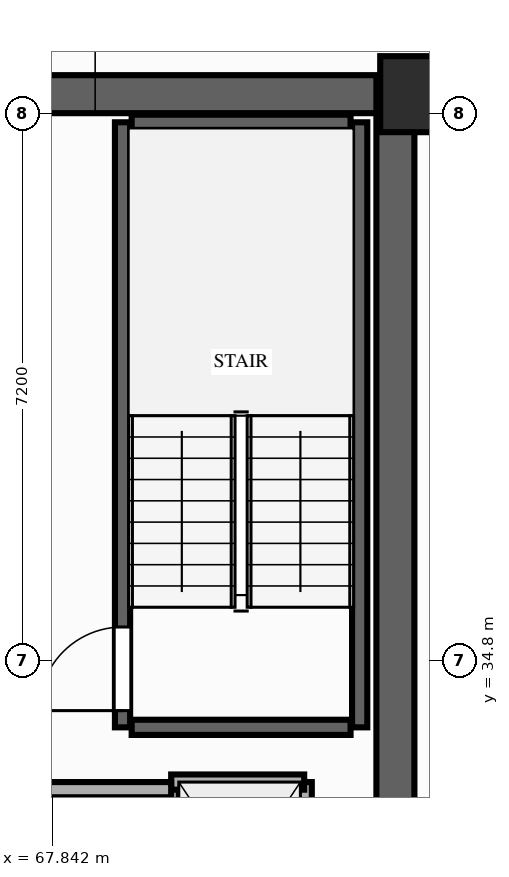
"""IFC4 building model, lengths in metres.
Left out: names, types, materials, properties, quantities, classifications, styles, units other than length and angle.
Written with IfcOpenShell. Run it as: python <this file> out.ifc"""

import sys

from ifc_helpers import new_model, si_unit, direction, frame, frame_2d, origin, origin_2d, place, context, subcontext, project, spatial, rectangle, extrude, element, fill, save


model = new_model("IFC4")
c1 = context("Model", 3, precision=1e-05, world=origin(), true_north=direction((0.0, 1.0)))
c2 = subcontext(c1, "Body", "Model", "MODEL_VIEW")
j1 = project(units=[si_unit("LENGTHUNIT", "METRE"), si_unit("PLANEANGLEUNIT", "RADIAN")], contexts=[c1])
p1 = place(None, origin())
s1 = spatial("IfcSite", under=j1, at=p1, CompositionType="ELEMENT")
p2 = place(p1, origin())
s2 = spatial("IfcBuilding", under=s1, at=p2, CompositionType="ELEMENT")
p3 = place(p2, frame((0.0, 0.0, 53.2)))
s3 = spatial("IfcBuildingStorey", under=s2, at=p3, CompositionType="ELEMENT", Elevation=53.2)
p4 = place(p3, frame((72.65, 42.25, 0.0), z_axis=(0.0, 0.0, 1.0), x_axis=(1.0, 0.0, 0.0)))
e1 = element("IfcColumn", 1, at=p4, inside=s3, PredefinedType="COLUMN", context=c2, shape_type="SweptSolid", body=[
    extrude(rectangle(XDim=1.0, YDim=1.0, at=origin_2d()), origin(), (0.0, 0.0, 1.0), 3.2),
])
p5 = place(p3, frame((72.35, 22.0, 0.0), z_axis=(0.0, 0.0, 1.0), x_axis=(0.0, 1.0, 0.0)))
e2 = element("IfcWall", 2, at=p5, inside=s3, PredefinedType="SHEAR", context=c2, shape_type="SweptSolid", body=[
    extrude(rectangle(XDim=20.25, YDim=0.5, at=frame_2d((10.125, 0.0))), origin(), (0.0, 0.0, 1.0), 3.02),
])
p6 = place(p3, frame((64.6, 42.25, 0.0), z_axis=(0.0, 0.0, 1.0), x_axis=(1.0, 0.0, 0.0)))
e3 = element("IfcWall", 3, at=p6, inside=s3, PredefinedType="SHEAR", context=c2, shape_type="SweptSolid", body=[
    extrude(rectangle(XDim=7.5, YDim=0.5, at=frame_2d((3.75, 0.0))), origin(), (0.0, 0.0, 1.0), 3.02),
])
p7 = place(p3, frame((68.76, 33.92, 0.0), z_axis=(0.0, 0.0, 1.0), x_axis=(0.0, 1.0, 0.0)))
e4 = element("IfcWall", 4, at=p7, inside=s3, PredefinedType="SHEAR", context=c2, shape_type="SweptSolid", body=[
    extrude(rectangle(XDim=7.96, YDim=0.2, at=frame_2d((3.98, 0.0))), origin(), (0.0, 0.0, 1.0), 3.02),
])
p8 = place(p7, frame((0.22, 0.0, 0.0)))
e5 = element("IfcOpeningElement", 5, at=p8, cuts=e4, PredefinedType="OPENING", context=c2, shape_type="SweptSolid", body=[
    extrude(rectangle(XDim=1.1, YDim=2.15, at=frame_2d((0.55, 1.075))), frame((0.0, 0.11, 0.0), z_axis=(0.0, -1.0, 0.0), x_axis=(1.0, 0.0, 0.0)), (0.0, 0.0, 1.0), 0.22),
])
p9 = place(p3, frame((71.88, 33.92, 0.0), z_axis=(0.0, 0.0, 1.0), x_axis=(0.0, 1.0, 0.0)))
e6 = element("IfcWall", 6, at=p9, inside=s3, PredefinedType="SHEAR", context=c2, shape_type="SweptSolid", body=[
    extrude(rectangle(XDim=7.96, YDim=0.2, at=frame_2d((3.98, 0.0))), origin(), (0.0, 0.0, 1.0), 3.02),
])
for number, where, z_axis, x_axis in (
    (7, (68.88, 41.88, 0.0), (0.0, 0.0, 1.0), (1.0, 0.0, 0.0)),
    (8, (68.88, 33.92, 0.0), (0.0, 0.0, 1.0), (1.0, 0.0, 0.0)),
):
    element("IfcWall", number, at=place(p3, frame(where, z_axis=z_axis, x_axis=x_axis)), inside=s3, PredefinedType="SHEAR", context=c2, shape_type="SweptSolid", body=[
        extrude(rectangle(XDim=2.88, YDim=0.2, at=frame_2d((1.44, 0.0))), origin(), (0.0, 0.0, 1.0), 3.02),
    ])
p10 = place(p3, frame((69.4, 30.75, 0.0), z_axis=(0.0, 0.0, 1.0), x_axis=(0.0, 1.0, 0.0)))
e9 = element("IfcWall", 9, at=p10, inside=s3, PredefinedType="MOVABLE", context=c2, shape_type="SweptSolid", body=[
    extrude(rectangle(XDim=2.45, YDim=0.2, at=frame_2d((1.225, 0.0))), origin(), (0.0, 0.0, 1.0), 3.02),
])
p11 = place(p10, frame((0.65, 0.0, 0.0)))
e10 = element("IfcOpeningElement", 10, at=p11, cuts=e9, PredefinedType="OPENING", context=c2, shape_type="SweptSolid", body=[
    extrude(rectangle(XDim=1.05, YDim=2.15, at=frame_2d((0.525, 1.075))), frame((0.0, 0.11, 0.0), z_axis=(0.0, -1.0, 0.0), x_axis=(1.0, 0.0, 0.0)), (0.0, 0.0, 1.0), 0.22),
])
p12 = place(p3, frame((71.15, 30.75, 0.0), z_axis=(0.0, 0.0, 1.0), x_axis=(0.0, 1.0, 0.0)))
e11 = element("IfcWall", 11, at=p12, inside=s3, PredefinedType="MOVABLE", context=c2, shape_type="SweptSolid", body=[
    extrude(rectangle(XDim=2.45, YDim=0.2, at=frame_2d((1.225, 0.0))), origin(), (0.0, 0.0, 1.0), 3.02),
])
p13 = place(p3, frame((69.4, 33.2, 0.0), z_axis=(0.0, 0.0, 1.0), x_axis=(1.0, 0.0, 0.0)))
e12 = element("IfcWall", 12, at=p13, inside=s3, PredefinedType="MOVABLE", context=c2, shape_type="SweptSolid", body=[
    extrude(rectangle(XDim=1.75, YDim=0.2, at=frame_2d((0.875, 0.0))), origin(), (0.0, 0.0, 1.0), 3.02),
])
p14 = place(p3, frame((65.8, 33.1, 0.0), z_axis=(0.0, 0.0, 1.0), x_axis=(1.0, 0.0, 0.0)))
e13 = element("IfcWall", 13, at=p14, inside=s3, PredefinedType="PARTITIONING", context=c2, shape_type="SweptSolid", body=[
    extrude(rectangle(XDim=3.6, YDim=0.2, at=frame_2d((1.8, 0.0))), origin(), (0.0, 0.0, 1.0), 3.02),
])
p15 = place(p8, origin())
e14 = element("IfcDoor", 14, at=p15, inside=s3, OperationType="SINGLE_SWING_LEFT", PredefinedType="DOOR", context=c2, shape_type="SweptSolid", body=[
    extrude(rectangle(XDim=1.1, YDim=2.15, at=frame_2d((0.55, 1.075))), frame((0.0, 0.025, 0.0), z_axis=(0.0, -1.0, 0.0), x_axis=(1.0, 0.0, 0.0)), (0.0, 0.0, 1.0), 0.05),
])
fill(e5, e14)
save(model, sys.argv[1])
